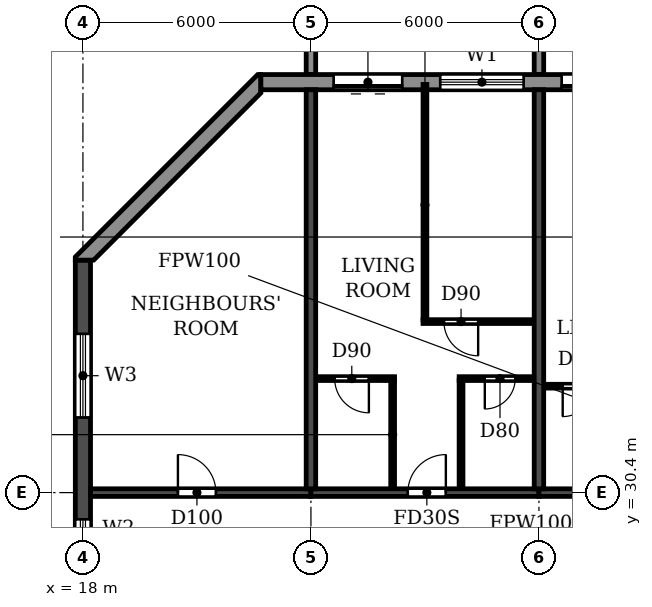
"""IFC4 building model, lengths in metres.
Left out: names, types, materials, properties, quantities, classifications, styles, units other than length and angle.
Written with IfcOpenShell. Run it as: python <this file> out.ifc"""

import sys

from ifc_helpers import new_model, si_unit, direction, frame, frame_2d, origin, place, context, subcontext, project, spatial, polyline, rectangle, outline, extrude, source, transform, mapped, element, fill, save


model = new_model("IFC4")
c1 = context("Model", 3, precision=1e-05, world=origin(), true_north=direction((0.0, 1.0)))
c2 = subcontext(c1, "Body", "Model", "MODEL_VIEW")
j1 = project(units=[si_unit("LENGTHUNIT", "METRE"), si_unit("PLANEANGLEUNIT", "RADIAN")], contexts=[c1])
p1 = place(None, origin())
s1 = spatial("IfcSite", under=j1, at=p1, CompositionType="ELEMENT")
p2 = place(p1, origin())
s2 = spatial("IfcBuilding", under=s1, at=p2, CompositionType="ELEMENT")
p3 = place(p2, frame((0.0, 0.0, 191.7)))
s3 = spatial("IfcBuildingStorey", under=s2, at=p3, CompositionType="ELEMENT", Elevation=191.7)
for number, where, z_axis, x_axis in (
    (1, (24.0, 30.5, 0.0), (0.0, 0.0, 1.0), (0.0, 1.0, 0.0)),
    (2, (30.0, 30.5, 0.0), (0.0, 0.0, 1.0), (0.0, 1.0, 0.0)),
):
    element("IfcWall", number, at=place(p3, frame(where, z_axis=z_axis, x_axis=x_axis)), inside=s3, PredefinedType="SHEAR", context=c2, shape_type="SweptSolid", body=[
        extrude(rectangle(XDim=10.5, YDim=0.25, at=frame_2d((5.25, 0.0))), origin(), (0.0, 0.0, 1.0), 3.08),
    ])
p4 = place(p3, frame((18.0, 4.683, 0.0), z_axis=(0.0, 0.0, 1.0), x_axis=(0.0, 1.0, 0.0)))
e3 = element("IfcWall", 3, at=p4, inside=s3, PredefinedType="SHEAR", context=c2, shape_type="SweptSolid", body=[
    extrude(rectangle(XDim=31.834, YDim=0.4, at=frame_2d((15.917, 0.0))), origin(), (0.0, 0.0, 1.0), 3.08),
])
p5 = place(p4, frame((23.817, 0.0, 0.9)))
e4 = element("IfcOpeningElement", 4, at=p5, cuts=e3, PredefinedType="OPENING", context=c2, shape_type="SweptSolid", body=[
    extrude(rectangle(XDim=1.2, YDim=1.5, at=frame_2d((0.6, 0.75))), frame((0.0, 0.21, 0.0), z_axis=(0.0, -1.0, 0.0), x_axis=(1.0, 0.0, 0.0)), (0.0, 0.0, 1.0), 0.42),
])
p6 = place(p4, frame((8.017, 0.0, 0.9)))
e5 = element("IfcOpeningElement", 5, at=p6, cuts=e3, PredefinedType="OPENING", context=c2, shape_type="SweptSolid", body=[
    extrude(rectangle(XDim=1.2, YDim=1.5, at=frame_2d((0.6, 0.75))), frame((0.0, 0.21, 0.0), z_axis=(0.0, -1.0, 0.0), x_axis=(1.0, 0.0, 0.0)), (0.0, 0.0, 1.0), 0.42),
])
p7 = place(p4, frame((27.694, 0.0, 0.6)))
e6 = element("IfcOpeningElement", 6, at=p7, cuts=e3, PredefinedType="OPENING", context=c2, shape_type="SweptSolid", body=[
    extrude(rectangle(XDim=2.2, YDim=1.8, at=frame_2d((1.1, 0.9))), frame((0.0, 0.21, 0.0), z_axis=(0.0, -1.0, 0.0), x_axis=(1.0, 0.0, 0.0)), (0.0, 0.0, 1.0), 0.42),
])
p8 = place(p4, frame((2.541, 0.0, 0.6)))
e7 = element("IfcOpeningElement", 7, at=p8, cuts=e3, PredefinedType="OPENING", context=c2, shape_type="SweptSolid", body=[
    extrude(rectangle(XDim=2.2, YDim=1.8, at=frame_2d((1.1, 0.9))), frame((0.0, 0.21, 0.0), z_axis=(0.0, -1.0, 0.0), x_axis=(1.0, 0.0, 0.0)), (0.0, 0.0, 1.0), 0.42),
])
p9 = place(p4, frame((15.917, 0.0, 0.9)))
e8 = element("IfcOpeningElement", 8, at=p9, cuts=e3, PredefinedType="OPENING", context=c2, shape_type="SweptSolid", body=[
    extrude(rectangle(XDim=1.2, YDim=1.5, at=frame_2d((0.6, 0.75))), frame((0.0, 0.21, 0.0), z_axis=(0.0, -1.0, 0.0), x_axis=(1.0, 0.0, 0.0)), (0.0, 0.0, 1.0), 0.42),
])
p10 = place(p3, frame((18.2, 30.4, 0.0), z_axis=(0.0, 0.0, 1.0), x_axis=(1.0, 0.0, 0.0)))
e9 = element("IfcWall", 9, at=p10, inside=s3, PredefinedType="SHEAR", context=c2, shape_type="SweptSolid", body=[
    extrude(rectangle(XDim=5.8, YDim=0.2, at=frame_2d((2.9, 0.0))), origin(), (0.0, 0.0, 1.0), 2.48),
])
p11 = place(p10, frame((2.3, 0.0, 0.0)))
e10 = element("IfcOpeningElement", 10, at=p11, cuts=e9, PredefinedType="OPENING", context=c2, shape_type="SweptSolid", body=[
    extrude(rectangle(XDim=1.0, YDim=2.1, at=frame_2d((0.5, 1.05))), frame((0.0, 0.11, 0.0), z_axis=(0.0, -1.0, 0.0), x_axis=(1.0, 0.0, 0.0)), (0.0, 0.0, 1.0), 0.22),
])
p12 = place(p3, frame((24.0, 30.4, 0.0), z_axis=(0.0, 0.0, 1.0), x_axis=(1.0, 0.0, 0.0)))
e11 = element("IfcWall", 11, at=p12, inside=s3, PredefinedType="SHEAR", context=c2, shape_type="SweptSolid", body=[
    extrude(rectangle(XDim=6.0, YDim=0.2, at=frame_2d((3.0, 0.0))), origin(), (0.0, 0.0, 1.0), 2.48),
])
p13 = place(p12, frame((2.55, 0.0, 0.0)))
e12 = element("IfcOpeningElement", 12, at=p13, cuts=e11, PredefinedType="OPENING", context=c2, shape_type="SweptSolid", body=[
    extrude(rectangle(XDim=1.0, YDim=2.1, at=frame_2d((0.5, 1.05))), frame((0.0, 0.11, 0.0), z_axis=(0.0, -1.0, 0.0), x_axis=(1.0, 0.0, 0.0)), (0.0, 0.0, 1.0), 0.22),
])
p14 = place(p3, frame((30.0, 30.4, 0.0), z_axis=(0.0, 0.0, 1.0), x_axis=(1.0, 0.0, 0.0)))
e13 = element("IfcWall", 13, at=p14, inside=s3, PredefinedType="SHEAR", context=c2, shape_type="SweptSolid", body=[
    extrude(rectangle(XDim=6.0, YDim=0.2, at=frame_2d((3.0, 0.0))), origin(), (0.0, 0.0, 1.0), 2.48),
])
p15 = place(p14, frame((2.45, 0.0, 0.0)))
e14 = element("IfcOpeningElement", 14, at=p15, cuts=e13, PredefinedType="OPENING", context=c2, shape_type="SweptSolid", body=[
    extrude(rectangle(XDim=1.0, YDim=2.1, at=frame_2d((0.5, 1.05))), frame((0.0, 0.11, 0.0), z_axis=(0.0, -1.0, 0.0), x_axis=(1.0, 0.0, 0.0)), (0.0, 0.0, 1.0), 0.22),
])
p16 = place(p3, frame((79.317, 41.2, 0.0), z_axis=(0.0, 0.0, 1.0), x_axis=(-1.0, 0.0, 0.0)))
e15 = element("IfcWall", 15, at=p16, inside=s3, PredefinedType="STANDARD", context=c2, shape_type="SweptSolid", body=[
    extrude(rectangle(XDim=56.634, YDim=0.4, at=frame_2d((28.317, 0.0))), origin(), (0.0, 0.0, 1.0), 3.08),
])
p17 = place(p16, frame((52.917, 0.0, 0.0)))
e16 = element("IfcOpeningElement", 16, at=p17, cuts=e15, PredefinedType="OPENING", context=c2, shape_type="SweptSolid", body=[
    extrude(rectangle(XDim=1.8, YDim=2.4, at=frame_2d((0.9, 1.2))), frame((0.0, 0.21, 0.0), z_axis=(0.0, -1.0, 0.0), x_axis=(1.0, 0.0, 0.0)), (0.0, 0.0, 1.0), 0.42),
])
p18 = place(p16, frame((49.717, 0.0, 0.9)))
e17 = element("IfcOpeningElement", 17, at=p18, cuts=e15, PredefinedType="OPENING", context=c2, shape_type="SweptSolid", body=[
    extrude(rectangle(XDim=2.2, YDim=1.5, at=frame_2d((1.1, 0.75))), frame((0.0, 0.21, 0.0), z_axis=(0.0, -1.0, 0.0), x_axis=(1.0, 0.0, 0.0)), (0.0, 0.0, 1.0), 0.42),
])
p19 = place(p16, frame((46.917, 0.0, 0.0)))
e18 = element("IfcOpeningElement", 18, at=p19, cuts=e15, PredefinedType="OPENING", context=c2, shape_type="SweptSolid", body=[
    extrude(rectangle(XDim=1.8, YDim=2.4, at=frame_2d((0.9, 1.2))), frame((0.0, 0.21, 0.0), z_axis=(0.0, -1.0, 0.0), x_axis=(1.0, 0.0, 0.0)), (0.0, 0.0, 1.0), 0.42),
])
p20 = place(p16, frame((43.717, 0.0, 0.9)))
e19 = element("IfcOpeningElement", 19, at=p20, cuts=e15, PredefinedType="OPENING", context=c2, shape_type="SweptSolid", body=[
    extrude(rectangle(XDim=2.2, YDim=1.5, at=frame_2d((1.1, 0.75))), frame((0.0, 0.21, 0.0), z_axis=(0.0, -1.0, 0.0), x_axis=(1.0, 0.0, 0.0)), (0.0, 0.0, 1.0), 0.42),
])
p21 = place(p16, frame((40.717, 0.0, 0.9)))
e20 = element("IfcOpeningElement", 20, at=p21, cuts=e15, PredefinedType="OPENING", context=c2, shape_type="SweptSolid", body=[
    extrude(rectangle(XDim=2.2, YDim=1.5, at=frame_2d((1.1, 0.75))), frame((0.0, 0.21, 0.0), z_axis=(0.0, -1.0, 0.0), x_axis=(1.0, 0.0, 0.0)), (0.0, 0.0, 1.0), 0.42),
])
p22 = place(p16, frame((37.717, 0.0, 0.9)))
e21 = element("IfcOpeningElement", 21, at=p22, cuts=e15, PredefinedType="OPENING", context=c2, shape_type="SweptSolid", body=[
    extrude(rectangle(XDim=2.2, YDim=1.5, at=frame_2d((1.1, 0.75))), frame((0.0, 0.21, 0.0), z_axis=(0.0, -1.0, 0.0), x_axis=(1.0, 0.0, 0.0)), (0.0, 0.0, 1.0), 0.42),
])
p23 = place(p16, frame((34.917, 0.0, 0.0)))
e22 = element("IfcOpeningElement", 22, at=p23, cuts=e15, PredefinedType="OPENING", context=c2, shape_type="SweptSolid", body=[
    extrude(rectangle(XDim=1.8, YDim=2.4, at=frame_2d((0.9, 1.2))), frame((0.0, 0.21, 0.0), z_axis=(0.0, -1.0, 0.0), x_axis=(1.0, 0.0, 0.0)), (0.0, 0.0, 1.0), 0.42),
])
p24 = place(p16, frame((31.717, 0.0, 0.9)))
e23 = element("IfcOpeningElement", 23, at=p24, cuts=e15, PredefinedType="OPENING", context=c2, shape_type="SweptSolid", body=[
    extrude(rectangle(XDim=2.2, YDim=1.5, at=frame_2d((1.1, 0.75))), frame((0.0, 0.21, 0.0), z_axis=(0.0, -1.0, 0.0), x_axis=(1.0, 0.0, 0.0)), (0.0, 0.0, 1.0), 0.42),
])
p25 = place(p16, frame((28.717, 0.0, 0.9)))
e24 = element("IfcOpeningElement", 24, at=p25, cuts=e15, PredefinedType="OPENING", context=c2, shape_type="SweptSolid", body=[
    extrude(rectangle(XDim=2.2, YDim=1.5, at=frame_2d((1.1, 0.75))), frame((0.0, 0.21, 0.0), z_axis=(0.0, -1.0, 0.0), x_axis=(1.0, 0.0, 0.0)), (0.0, 0.0, 1.0), 0.42),
])
p26 = place(p16, frame((25.717, 0.0, 0.9)))
e25 = element("IfcOpeningElement", 25, at=p26, cuts=e15, PredefinedType="OPENING", context=c2, shape_type="SweptSolid", body=[
    extrude(rectangle(XDim=2.2, YDim=1.5, at=frame_2d((1.1, 0.75))), frame((0.0, 0.21, 0.0), z_axis=(0.0, -1.0, 0.0), x_axis=(1.0, 0.0, 0.0)), (0.0, 0.0, 1.0), 0.42),
])
p27 = place(p16, frame((22.917, 0.0, 0.0)))
e26 = element("IfcOpeningElement", 26, at=p27, cuts=e15, PredefinedType="OPENING", context=c2, shape_type="SweptSolid", body=[
    extrude(rectangle(XDim=1.8, YDim=2.4, at=frame_2d((0.9, 1.2))), frame((0.0, 0.21, 0.0), z_axis=(0.0, -1.0, 0.0), x_axis=(1.0, 0.0, 0.0)), (0.0, 0.0, 1.0), 0.42),
])
p28 = place(p16, frame((19.717, 0.0, 0.9)))
e27 = element("IfcOpeningElement", 27, at=p28, cuts=e15, PredefinedType="OPENING", context=c2, shape_type="SweptSolid", body=[
    extrude(rectangle(XDim=2.2, YDim=1.5, at=frame_2d((1.1, 0.75))), frame((0.0, 0.21, 0.0), z_axis=(0.0, -1.0, 0.0), x_axis=(1.0, 0.0, 0.0)), (0.0, 0.0, 1.0), 0.42),
])
p29 = place(p16, frame((16.717, 0.0, 0.9)))
e28 = element("IfcOpeningElement", 28, at=p29, cuts=e15, PredefinedType="OPENING", context=c2, shape_type="SweptSolid", body=[
    extrude(rectangle(XDim=2.2, YDim=1.5, at=frame_2d((1.1, 0.75))), frame((0.0, 0.21, 0.0), z_axis=(0.0, -1.0, 0.0), x_axis=(1.0, 0.0, 0.0)), (0.0, 0.0, 1.0), 0.42),
])
p30 = place(p16, frame((13.717, 0.0, 0.9)))
e29 = element("IfcOpeningElement", 29, at=p30, cuts=e15, PredefinedType="OPENING", context=c2, shape_type="SweptSolid", body=[
    extrude(rectangle(XDim=2.2, YDim=1.5, at=frame_2d((1.1, 0.75))), frame((0.0, 0.21, 0.0), z_axis=(0.0, -1.0, 0.0), x_axis=(1.0, 0.0, 0.0)), (0.0, 0.0, 1.0), 0.42),
])
p31 = place(p16, frame((10.717, 0.0, 0.9)))
e30 = element("IfcOpeningElement", 30, at=p31, cuts=e15, PredefinedType="OPENING", context=c2, shape_type="SweptSolid", body=[
    extrude(rectangle(XDim=2.2, YDim=1.5, at=frame_2d((1.1, 0.75))), frame((0.0, 0.21, 0.0), z_axis=(0.0, -1.0, 0.0), x_axis=(1.0, 0.0, 0.0)), (0.0, 0.0, 1.0), 0.42),
])
p32 = place(p16, frame((7.917, 0.0, 0.0)))
e31 = element("IfcOpeningElement", 31, at=p32, cuts=e15, PredefinedType="OPENING", context=c2, shape_type="SweptSolid", body=[
    extrude(rectangle(XDim=1.8, YDim=2.4, at=frame_2d((0.9, 1.2))), frame((0.0, 0.21, 0.0), z_axis=(0.0, -1.0, 0.0), x_axis=(1.0, 0.0, 0.0)), (0.0, 0.0, 1.0), 0.42),
])
p33 = place(p16, frame((4.717, 0.0, 0.9)))
e32 = element("IfcOpeningElement", 32, at=p33, cuts=e15, PredefinedType="OPENING", context=c2, shape_type="SweptSolid", body=[
    extrude(rectangle(XDim=2.2, YDim=1.5, at=frame_2d((1.1, 0.75))), frame((0.0, 0.21, 0.0), z_axis=(0.0, -1.0, 0.0), x_axis=(1.0, 0.0, 0.0)), (0.0, 0.0, 1.0), 0.42),
])
p34 = place(p16, frame((1.917, 0.0, 0.0)))
e33 = element("IfcOpeningElement", 33, at=p34, cuts=e15, PredefinedType="OPENING", context=c2, shape_type="SweptSolid", body=[
    extrude(rectangle(XDim=1.8, YDim=2.4, at=frame_2d((0.9, 1.2))), frame((0.0, 0.21, 0.0), z_axis=(0.0, -1.0, 0.0), x_axis=(1.0, 0.0, 0.0)), (0.0, 0.0, 1.0), 0.42),
])
p35 = place(p3, origin())
e34 = element("IfcWall", 34, at=p35, inside=s3, PredefinedType="STANDARD", context=c2, shape_type="SweptSolid", body=[
    extrude(outline(polyline([(22.683, 41.4), (22.6, 41.4), (17.8, 36.6), (17.8, 36.517), (18.283, 36.517), (22.683, 40.917), (22.683, 41.4)])), origin(), (0.0, 0.0, 1.0), 3.08),
])
m1 = source(origin(), c2, "Body", "SweptSolid", [
    extrude(outline(polyline([(0.0, 0.0), (0.25, 0.0), (0.25, 3.1), (0.0, 3.1), (0.0, 0.0)])), origin(), (0.0, 0.0, 1.0), 3.1),
])
for number, where in (
    (35, (23.875, 41.4, 0.0)),
    (36, (29.875, 41.4, 0.0)),
):
    element("IfcWall", number, at=place(p3, frame(where)), inside=s3, PredefinedType="STANDARD", context=c2, shape_type="MappedRepresentation", body=[
        mapped(m1, transform((0.0, 0.0, 0.0))),
    ])
p36 = place(p3, frame((30.135, 33.2, 0.0), z_axis=(0.0, 0.0, 1.0), x_axis=(1.0, 0.0, 0.0)))
e37 = element("IfcWall", 37, at=p36, inside=s3, PredefinedType="PARTITIONING", context=c2, shape_type="SweptSolid", body=[
    extrude(rectangle(XDim=1.965, YDim=0.1, at=frame_2d((0.982, 0.0))), origin(), (0.0, 0.0, 1.0), 3.08),
])
p37 = place(p36, frame((0.49, 0.0, 0.0)))
e38 = element("IfcOpeningElement", 38, at=p37, cuts=e37, PredefinedType="OPENING", context=c2, shape_type="SweptSolid", body=[
    extrude(rectangle(XDim=0.8, YDim=2.1, at=frame_2d((0.4, 1.05))), frame((0.0, 0.06, 0.0), z_axis=(0.0, -1.0, 0.0), x_axis=(1.0, 0.0, 0.0)), (0.0, 0.0, 1.0), 0.12),
])
p38 = place(p3, frame((24.135, 33.4, 0.0), z_axis=(0.0, 0.0, 1.0), x_axis=(1.0, 0.0, 0.0)))
e39 = element("IfcWall", 39, at=p38, inside=s3, PredefinedType="PARTITIONING", context=c2, shape_type="SweptSolid", body=[
    extrude(rectangle(XDim=2.065, YDim=0.1, at=frame_2d((1.032, 0.0))), origin(), (0.0, 0.0, 1.0), 3.08),
])
p39 = place(p38, frame((0.49, 0.0, 0.0)))
e40 = element("IfcOpeningElement", 40, at=p39, cuts=e39, PredefinedType="OPENING", context=c2, shape_type="SweptSolid", body=[
    extrude(rectangle(XDim=0.9, YDim=2.1, at=frame_2d((0.45, 1.05))), frame((0.0, 0.06, 0.0), z_axis=(0.0, -1.0, 0.0), x_axis=(1.0, 0.0, 0.0)), (0.0, 0.0, 1.0), 0.12),
])
p40 = place(p3, frame((27.9, 33.4, 0.0), z_axis=(0.0, 0.0, 1.0), x_axis=(1.0, 0.0, 0.0)))
e41 = element("IfcWall", 41, at=p40, inside=s3, PredefinedType="PARTITIONING", context=c2, shape_type="SweptSolid", body=[
    extrude(rectangle(XDim=1.965, YDim=0.1, at=frame_2d((0.982, 0.0))), origin(), (0.0, 0.0, 1.0), 3.08),
])
p41 = place(p40, frame((0.675, 0.0, 0.0)))
e42 = element("IfcOpeningElement", 42, at=p41, cuts=e41, PredefinedType="OPENING", context=c2, shape_type="SweptSolid", body=[
    extrude(rectangle(XDim=0.8, YDim=2.1, at=frame_2d((0.4, 1.05))), frame((0.0, 0.06, 0.0), z_axis=(0.0, -1.0, 0.0), x_axis=(1.0, 0.0, 0.0)), (0.0, 0.0, 1.0), 0.12),
])
p42 = place(p3, frame((26.95, 34.9, 0.0), z_axis=(0.0, 0.0, 1.0), x_axis=(1.0, 0.0, 0.0)))
e43 = element("IfcWall", 43, at=p42, inside=s3, PredefinedType="PARTITIONING", context=c2, shape_type="SweptSolid", body=[
    extrude(rectangle(XDim=2.915, YDim=0.1, at=frame_2d((1.458, 0.0))), origin(), (0.0, 0.0, 1.0), 3.08),
])
p43 = place(p42, frame((0.55, 0.0, 0.0)))
e44 = element("IfcOpeningElement", 44, at=p43, cuts=e43, PredefinedType="OPENING", context=c2, shape_type="SweptSolid", body=[
    extrude(rectangle(XDim=0.9, YDim=2.1, at=frame_2d((0.45, 1.05))), frame((0.0, 0.06, 0.0), z_axis=(0.0, -1.0, 0.0), x_axis=(1.0, 0.0, 0.0)), (0.0, 0.0, 1.0), 0.12),
])
p44 = place(p3, frame((26.15, 30.51, 0.0), z_axis=(0.0, 0.0, 1.0), x_axis=(0.0, 1.0, 0.0)))
e45 = element("IfcWall", 45, at=p44, inside=s3, PredefinedType="PARTITIONING", context=c2, shape_type="SweptSolid", body=[
    extrude(rectangle(XDim=2.84, YDim=0.1, at=frame_2d((1.42, 0.0))), origin(), (0.0, 0.0, 1.0), 3.08),
])
p45 = place(p3, frame((27.0, 34.95, 0.0), z_axis=(0.0, 0.0, 1.0), x_axis=(0.0, 1.0, 0.0)))
e46 = element("IfcWall", 46, at=p45, inside=s3, PredefinedType="PARTITIONING", context=c2, shape_type="SweptSolid", body=[
    extrude(rectangle(XDim=6.19, YDim=0.1, at=frame_2d((3.095, 0.0))), origin(), (0.0, 0.0, 1.0), 3.08),
])
p46 = place(p3, frame((27.95, 30.51, 0.0), z_axis=(0.0, 0.0, 1.0), x_axis=(0.0, 1.0, 0.0)))
e47 = element("IfcWall", 47, at=p46, inside=s3, PredefinedType="PARTITIONING", context=c2, shape_type="SweptSolid", body=[
    extrude(rectangle(XDim=2.84, YDim=0.1, at=frame_2d((1.42, 0.0))), origin(), (0.0, 0.0, 1.0), 3.08),
])
p47 = place(p17, origin())
e48 = element("IfcDoor", 48, at=p47, inside=s3, OperationType="DOUBLE_DOOR_SLIDING", PredefinedType="DOOR", context=c2, shape_type="SweptSolid", body=[
    extrude(rectangle(XDim=1.8, YDim=2.4, at=frame_2d((0.9, 1.2))), frame((0.0, 0.025, 0.0), z_axis=(0.0, -1.0, 0.0), x_axis=(1.0, 0.0, 0.0)), (0.0, 0.0, 1.0), 0.05),
])
fill(e16, e48)
p48 = place(p18, origin())
e49 = element("IfcWindow", 49, at=p48, inside=s3, PartitioningType="DOUBLE_PANEL_HORIZONTAL", PredefinedType="WINDOW", context=c2, shape_type="SweptSolid", body=[
    extrude(rectangle(XDim=2.2, YDim=1.5, at=frame_2d((1.1, 0.75))), frame((0.0, 0.03, 0.0), z_axis=(0.0, -1.0, 0.0), x_axis=(1.0, 0.0, 0.0)), (0.0, 0.0, 1.0), 0.06),
])
fill(e17, e49)
p49 = place(p19, origin())
e50 = element("IfcDoor", 50, at=p49, inside=s3, OperationType="DOUBLE_DOOR_SLIDING", PredefinedType="DOOR", context=c2, shape_type="SweptSolid", body=[
    extrude(rectangle(XDim=1.8, YDim=2.4, at=frame_2d((0.9, 1.2))), frame((0.0, 0.025, 0.0), z_axis=(0.0, -1.0, 0.0), x_axis=(1.0, 0.0, 0.0)), (0.0, 0.0, 1.0), 0.05),
])
fill(e18, e50)
p50 = place(p5, origin())
e51 = element("IfcWindow", 51, at=p50, inside=s3, PartitioningType="SINGLE_PANEL", PredefinedType="WINDOW", context=c2, shape_type="SweptSolid", body=[
    extrude(rectangle(XDim=1.2, YDim=1.5, at=frame_2d((0.6, 0.75))), frame((0.0, 0.03, 0.0), z_axis=(0.0, -1.0, 0.0), x_axis=(1.0, 0.0, 0.0)), (0.0, 0.0, 1.0), 0.06),
])
fill(e4, e51)
p51 = place(p7, origin())
e52 = element("IfcWindow", 52, at=p51, inside=s3, PartitioningType="DOUBLE_PANEL_HORIZONTAL", PredefinedType="WINDOW", context=c2, shape_type="SweptSolid", body=[
    extrude(rectangle(XDim=2.2, YDim=1.8, at=frame_2d((1.1, 0.9))), frame((0.0, 0.03, 0.0), z_axis=(0.0, -1.0, 0.0), x_axis=(1.0, 0.0, 0.0)), (0.0, 0.0, 1.0), 0.06),
])
fill(e6, e52)
p52 = place(p11, origin())
e53 = element("IfcDoor", 53, at=p52, inside=s3, OperationType="SINGLE_SWING_LEFT", PredefinedType="DOOR", context=c2, shape_type="SweptSolid", body=[
    extrude(rectangle(XDim=1.0, YDim=2.1, at=frame_2d((0.5, 1.05))), frame((0.0, 0.025, 0.0), z_axis=(0.0, -1.0, 0.0), x_axis=(1.0, 0.0, 0.0)), (0.0, 0.0, 1.0), 0.05),
])
fill(e10, e53)
p53 = place(p39, frame((0.9, 0.0, 0.0), z_axis=(0.0, 0.0, 1.0), x_axis=(-1.0, 0.0, 0.0)))
e54 = element("IfcDoor", 54, at=p53, inside=s3, OperationType="SINGLE_SWING_LEFT", PredefinedType="DOOR", context=c2, shape_type="SweptSolid", body=[
    extrude(rectangle(XDim=0.9, YDim=2.1, at=frame_2d((0.45, 1.05))), frame((0.0, 0.025, 0.0), z_axis=(0.0, -1.0, 0.0), x_axis=(1.0, 0.0, 0.0)), (0.0, 0.0, 1.0), 0.05),
])
fill(e40, e54)
p54 = place(p13, origin())
e55 = element("IfcDoor", 55, at=p54, inside=s3, OperationType="SINGLE_SWING_RIGHT", PredefinedType="DOOR", context=c2, shape_type="SweptSolid", body=[
    extrude(rectangle(XDim=1.0, YDim=2.1, at=frame_2d((0.5, 1.05))), frame((0.0, 0.025, 0.0), z_axis=(0.0, -1.0, 0.0), x_axis=(1.0, 0.0, 0.0)), (0.0, 0.0, 1.0), 0.05),
])
fill(e12, e55)
p55 = place(p43, frame((0.9, 0.0, 0.0), z_axis=(0.0, 0.0, 1.0), x_axis=(-1.0, 0.0, 0.0)))
e56 = element("IfcDoor", 56, at=p55, inside=s3, OperationType="SINGLE_SWING_LEFT", PredefinedType="DOOR", context=c2, shape_type="SweptSolid", body=[
    extrude(rectangle(XDim=0.9, YDim=2.1, at=frame_2d((0.45, 1.05))), frame((0.0, 0.025, 0.0), z_axis=(0.0, -1.0, 0.0), x_axis=(1.0, 0.0, 0.0)), (0.0, 0.0, 1.0), 0.05),
])
fill(e44, e56)
p56 = place(p41, frame((0.8, 0.0, 0.0), z_axis=(0.0, 0.0, 1.0), x_axis=(-1.0, 0.0, 0.0)))
e57 = element("IfcDoor", 57, at=p56, inside=s3, OperationType="SINGLE_SWING_RIGHT", PredefinedType="DOOR", context=c2, shape_type="SweptSolid", body=[
    extrude(rectangle(XDim=0.8, YDim=2.1, at=frame_2d((0.4, 1.05))), frame((0.0, 0.025, 0.0), z_axis=(0.0, -1.0, 0.0), x_axis=(1.0, 0.0, 0.0)), (0.0, 0.0, 1.0), 0.05),
])
fill(e42, e57)
p57 = place(p37, frame((0.8, 0.0, 0.0), z_axis=(0.0, 0.0, 1.0), x_axis=(-1.0, 0.0, 0.0)))
e58 = element("IfcDoor", 58, at=p57, inside=s3, OperationType="SINGLE_SWING_RIGHT", PredefinedType="DOOR", context=c2, shape_type="SweptSolid", body=[
    extrude(rectangle(XDim=0.8, YDim=2.1, at=frame_2d((0.4, 1.05))), frame((0.0, 0.025, 0.0), z_axis=(0.0, -1.0, 0.0), x_axis=(1.0, 0.0, 0.0)), (0.0, 0.0, 1.0), 0.05),
])
fill(e38, e58)
save(model, sys.argv[1])
